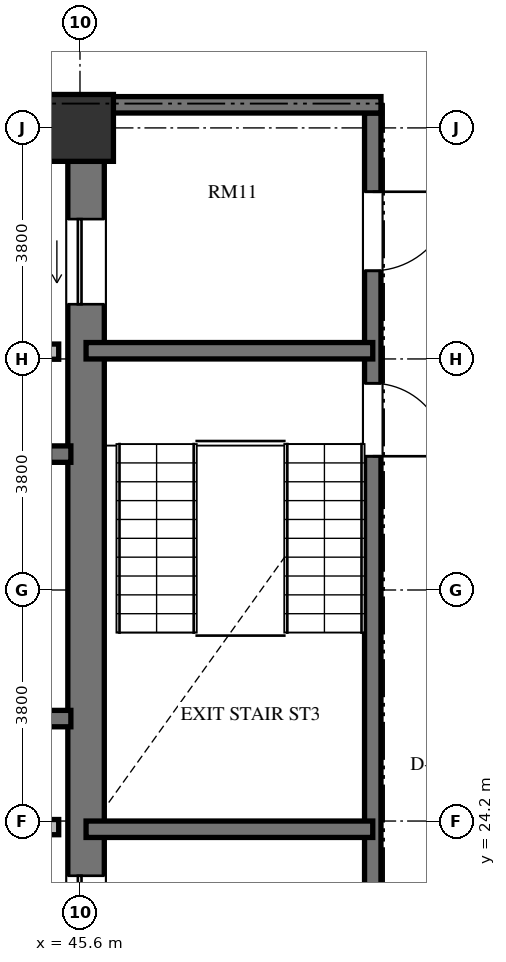
"""IFC4 building model, lengths in metres.
Left out: names, types, materials, properties, quantities, classifications, styles, units other than length and angle.
Written with IfcOpenShell. Run it as: python <this file> out.ifc"""

import sys

from ifc_helpers import new_model, si_unit, direction, frame, frame_2d, origin, origin_2d, place, context, subcontext, project, spatial, rectangle, extrude, element, fill, save


model = new_model("IFC4")
c1 = context("Model", 3, precision=1e-05, world=origin(), true_north=direction((0.0, 1.0)))
c2 = subcontext(c1, "Body", "Model", "MODEL_VIEW")
j1 = project(units=[si_unit("LENGTHUNIT", "METRE"), si_unit("PLANEANGLEUNIT", "RADIAN")], contexts=[c1])
p1 = place(None, origin())
s1 = spatial("IfcSite", under=j1, at=p1, CompositionType="ELEMENT")
p2 = place(p1, origin())
s2 = spatial("IfcBuilding", under=s1, at=p2, CompositionType="ELEMENT")
p3 = place(p2, frame((0.0, 0.0, 185.712)))
s3 = spatial("IfcBuildingStorey", under=s2, at=p3, CompositionType="ELEMENT", Elevation=185.712)
p4 = place(p3, frame((45.6, 35.6, 0.0), z_axis=(0.0, 0.0, 1.0), x_axis=(1.0, 0.0, 0.0)))
e1 = element("IfcColumn", 1, at=p4, inside=s3, PredefinedType="COLUMN", context=c2, shape_type="SweptSolid", body=[
    extrude(rectangle(XDim=1.1, YDim=1.1, at=origin_2d()), origin(), (0.0, 0.0, 1.0), 3.648),
])
p5 = place(p3, frame((45.7, 20.95, 0.0), z_axis=(0.0, 0.0, 1.0), x_axis=(0.0, 1.0, 0.0)))
e2 = element("IfcWall", 2, at=p5, inside=s3, PredefinedType="SHEAR", context=c2, shape_type="SweptSolid", body=[
    extrude(rectangle(XDim=14.1, YDim=0.6, at=frame_2d((7.05, 0.0))), origin(), (0.0, 0.0, 1.0), 3.648),
])
p6 = place(p5, frame((11.75, 0.0, 0.0)))
e3 = element("IfcOpeningElement", 3, at=p6, cuts=e2, PredefinedType="OPENING", context=c2, shape_type="SweptSolid", body=[
    extrude(rectangle(XDim=1.4, YDim=2.3, at=frame_2d((0.7, 1.15))), frame((0.0, 0.31, 0.0), z_axis=(0.0, -1.0, 0.0), x_axis=(1.0, 0.0, 0.0)), (0.0, 0.0, 1.0), 0.62),
])
p7 = place(p5, frame((0.95, 0.0, 0.0)))
e4 = element("IfcOpeningElement", 4, at=p7, cuts=e2, PredefinedType="OPENING", context=c2, shape_type="SweptSolid", body=[
    extrude(rectangle(XDim=1.4, YDim=2.3, at=frame_2d((0.7, 1.15))), frame((0.0, 0.31, 0.0), z_axis=(0.0, -1.0, 0.0), x_axis=(1.0, 0.0, 0.0)), (0.0, 0.0, 1.0), 0.62),
])
p8 = place(p3, frame((37.465, 30.235, 0.0), z_axis=(0.0, 0.0, 1.0), x_axis=(1.0, 0.0, 0.0)))
e5 = element("IfcWall", 5, at=p8, inside=s3, PredefinedType="SHEAR", context=c2, shape_type="SweptSolid", body=[
    extrude(rectangle(XDim=7.985, YDim=0.27, at=frame_2d((3.992, 0.0))), origin(), (0.0, 0.0, 1.0), 3.648),
])
p9 = place(p8, frame((6.455, 0.0, 0.0)))
e6 = element("IfcOpeningElement", 6, at=p9, cuts=e5, PredefinedType="OPENING", context=c2, shape_type="SweptSolid", body=[
    extrude(rectangle(XDim=1.2, YDim=2.15, at=frame_2d((0.6, 1.075))), frame((0.0, 0.145, 0.0), z_axis=(0.0, -1.0, 0.0), x_axis=(1.0, 0.0, 0.0)), (0.0, 0.0, 1.0), 0.29),
])
p10 = place(p3, frame((37.465, 25.885, 0.0), z_axis=(0.0, 0.0, 1.0), x_axis=(1.0, 0.0, 0.0)))
e7 = element("IfcWall", 7, at=p10, inside=s3, PredefinedType="SHEAR", context=c2, shape_type="SweptSolid", body=[
    extrude(rectangle(XDim=7.985, YDim=0.27, at=frame_2d((3.992, 0.0))), origin(), (0.0, 0.0, 1.0), 3.648),
])
for number, where, z_axis, x_axis in (
    (8, (42.95, 31.92, 0.0), (0.0, 0.0, 1.0), (1.0, 0.0, 0.0)),
    (9, (42.95, 24.1, 0.0), (0.0, 0.0, 1.0), (1.0, 0.0, 0.0)),
):
    element("IfcWall", number, at=place(p3, frame(where, z_axis=z_axis, x_axis=x_axis)), inside=s3, PredefinedType="SOLIDWALL", context=c2, shape_type="SweptSolid", body=[
        extrude(rectangle(XDim=2.3, YDim=0.25, at=frame_2d((1.15, 0.0))), origin(), (0.0, 0.0, 1.0), 3.198),
    ])
p11 = place(p3, frame((50.415, 35.845, 0.0), z_axis=(0.0, 0.0, 1.0), x_axis=(0.0, -1.0, 0.0)))
e10 = element("IfcWall", 10, at=p11, inside=s3, PredefinedType="SHEAR", context=c2, shape_type="SweptSolid", body=[
    extrude(rectangle(XDim=15.825, YDim=0.27, at=frame_2d((7.913, 0.0))), origin(), (0.0, 0.0, 1.0), 3.648),
])
p12 = place(p11, frame((4.445, 0.0, 0.0)))
e11 = element("IfcOpeningElement", 11, at=p12, cuts=e10, PredefinedType="OPENING", context=c2, shape_type="SweptSolid", body=[
    extrude(rectangle(XDim=1.2, YDim=2.15, at=frame_2d((0.6, 1.075))), frame((0.0, 0.145, 0.0), z_axis=(0.0, -1.0, 0.0), x_axis=(1.0, 0.0, 0.0)), (0.0, 0.0, 1.0), 0.29),
])
p13 = place(p11, frame((1.295, 0.0, 0.0)))
e12 = element("IfcOpeningElement", 12, at=p13, cuts=e10, PredefinedType="OPENING", context=c2, shape_type="SweptSolid", body=[
    extrude(rectangle(XDim=1.3, YDim=2.2, at=frame_2d((0.65, 1.1))), frame((0.0, 0.145, 0.0), z_axis=(0.0, -1.0, 0.0), x_axis=(1.0, 0.0, 0.0)), (0.0, 0.0, 1.0), 0.29),
])
p14 = place(p11, frame((13.095, 0.0, 0.0)))
e13 = element("IfcOpeningElement", 13, at=p14, cuts=e10, PredefinedType="OPENING", context=c2, shape_type="SweptSolid", body=[
    extrude(rectangle(XDim=1.3, YDim=2.2, at=frame_2d((0.65, 1.1))), frame((0.0, 0.145, 0.0), z_axis=(0.0, -1.0, 0.0), x_axis=(1.0, 0.0, 0.0)), (0.0, 0.0, 1.0), 0.29),
])
p15 = place(p3, frame((46.0, 35.98, 0.0), z_axis=(0.0, 0.0, 1.0), x_axis=(1.0, 0.0, 0.0)))
e14 = element("IfcWall", 14, at=p15, inside=s3, PredefinedType="SHEAR", context=c2, shape_type="SweptSolid", body=[
    extrude(rectangle(XDim=4.55, YDim=0.27, at=frame_2d((2.275, 0.0))), origin(), (0.0, 0.0, 1.0), 3.648),
])
for number, where, z_axis, x_axis in (
    (15, (45.7, 31.935, 0.0), (0.0, 0.0, 1.0), (1.0, 0.0, 0.0)),
    (16, (45.7, 24.065, 0.0), (0.0, 0.0, 1.0), (1.0, 0.0, 0.0)),
):
    element("IfcWall", number, at=place(p3, frame(where, z_axis=z_axis, x_axis=x_axis)), inside=s3, PredefinedType="SHEAR", context=c2, shape_type="SweptSolid", body=[
        extrude(rectangle(XDim=4.715, YDim=0.27, at=frame_2d((2.357, 0.0))), origin(), (0.0, 0.0, 1.0), 3.648),
    ])
p16 = place(p6, origin())
e17 = element("IfcDoor", 17, at=p16, inside=s3, OperationType="SLIDING_TO_LEFT", PredefinedType="DOOR", context=c2, shape_type="SweptSolid", body=[
    extrude(rectangle(XDim=1.4, YDim=2.3, at=frame_2d((0.7, 1.15))), frame((0.0, 0.025, 0.0), z_axis=(0.0, -1.0, 0.0), x_axis=(1.0, 0.0, 0.0)), (0.0, 0.0, 1.0), 0.05),
])
fill(e3, e17)
p17 = place(p7, origin())
e18 = element("IfcDoor", 18, at=p17, inside=s3, OperationType="SLIDING_TO_LEFT", PredefinedType="DOOR", context=c2, shape_type="SweptSolid", body=[
    extrude(rectangle(XDim=1.4, YDim=2.3, at=frame_2d((0.7, 1.15))), frame((0.0, 0.025, 0.0), z_axis=(0.0, -1.0, 0.0), x_axis=(1.0, 0.0, 0.0)), (0.0, 0.0, 1.0), 0.05),
])
fill(e4, e18)
p18 = place(p12, origin())
e19 = element("IfcDoor", 19, at=p18, inside=s3, OperationType="SINGLE_SWING_RIGHT", PredefinedType="DOOR", context=c2, shape_type="SweptSolid", body=[
    extrude(rectangle(XDim=1.2, YDim=2.15, at=frame_2d((0.6, 1.075))), frame((0.0, 0.025, 0.0), z_axis=(0.0, -1.0, 0.0), x_axis=(1.0, 0.0, 0.0)), (0.0, 0.0, 1.0), 0.05),
])
fill(e11, e19)
p19 = place(p13, origin())
e20 = element("IfcDoor", 20, at=p19, inside=s3, OperationType="SINGLE_SWING_LEFT", PredefinedType="DOOR", context=c2, shape_type="SweptSolid", body=[
    extrude(rectangle(XDim=1.3, YDim=2.2, at=frame_2d((0.65, 1.1))), frame((0.0, 0.025, 0.0), z_axis=(0.0, -1.0, 0.0), x_axis=(1.0, 0.0, 0.0)), (0.0, 0.0, 1.0), 0.05),
])
fill(e12, e20)
save(model, sys.argv[1])
